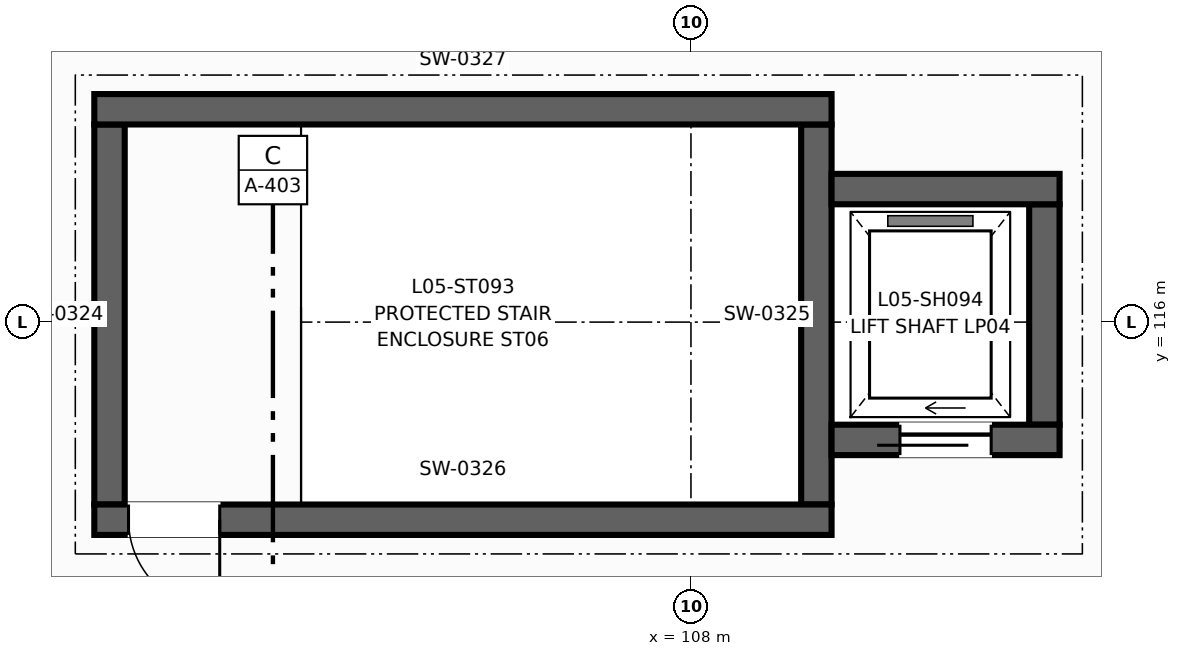
"""IFC4 building model, lengths in metres.
Left out: names, types, materials, properties, quantities, classifications, styles, units other than length and angle.
Written with IfcOpenShell. Run it as: python <this file> out.ifc"""

import sys

from ifc_helpers import new_model, si_unit, direction, frame, frame_2d, origin, place, context, subcontext, project, spatial, rectangle, extrude, element, fill, save


model = new_model("IFC4")
c1 = context("Model", 3, precision=1e-05, world=origin(), true_north=direction((0.0, 1.0)))
c2 = subcontext(c1, "Body", "Model", "MODEL_VIEW")
j1 = project(units=[si_unit("LENGTHUNIT", "METRE"), si_unit("PLANEANGLEUNIT", "RADIAN")], contexts=[c1])
p1 = place(None, origin())
s1 = spatial("IfcSite", under=j1, at=p1, CompositionType="ELEMENT")
p2 = place(p1, origin())
s2 = spatial("IfcBuilding", under=s1, at=p2, CompositionType="ELEMENT")
p3 = place(p2, frame((0.0, 0.0, 22.5)))
s3 = spatial("IfcBuildingStorey", under=s2, at=p3, CompositionType="ELEMENT", Elevation=22.5)
for number, where, z_axis, x_axis in (
    (1, (100.35, 113.6, 0.0), (0.0, 0.0, 1.0), (0.0, 1.0, 0.0)),
    (2, (109.65, 113.6, 0.0), (0.0, 0.0, 1.0), (0.0, 1.0, 0.0)),
):
    element("IfcWall", number, at=place(p3, frame(where, z_axis=z_axis, x_axis=x_axis)), inside=s3, PredefinedType="SHEAR", context=c2, shape_type="SweptSolid", body=[
        extrude(rectangle(XDim=5.0, YDim=0.4, at=frame_2d((2.5, 0.0))), origin(), (0.0, 0.0, 1.0), 4.28),
    ])
p4 = place(p3, frame((100.15, 113.4, 0.0), z_axis=(0.0, 0.0, 1.0), x_axis=(1.0, 0.0, 0.0)))
e3 = element("IfcWall", 3, at=p4, inside=s3, PredefinedType="SHEAR", context=c2, shape_type="SweptSolid", body=[
    extrude(rectangle(XDim=9.7, YDim=0.4, at=frame_2d((4.85, 0.0))), origin(), (0.0, 0.0, 1.0), 4.28),
])
p5 = place(p4, frame((0.45, 0.0, 0.0)))
e4 = element("IfcOpeningElement", 4, at=p5, cuts=e3, PredefinedType="OPENING", context=c2, shape_type="SweptSolid", body=[
    extrude(rectangle(XDim=1.2, YDim=2.2, at=frame_2d((0.6, 1.1))), frame((0.0, 0.21, 0.0), z_axis=(0.0, -1.0, 0.0), x_axis=(1.0, 0.0, 0.0)), (0.0, 0.0, 1.0), 0.42),
])
p6 = place(p3, frame((100.15, 118.8, 0.0), z_axis=(0.0, 0.0, 1.0), x_axis=(1.0, 0.0, 0.0)))
e5 = element("IfcWall", 5, at=p6, inside=s3, PredefinedType="SHEAR", context=c2, shape_type="SweptSolid", body=[
    extrude(rectangle(XDim=9.7, YDim=0.4, at=frame_2d((4.85, 0.0))), origin(), (0.0, 0.0, 1.0), 4.28),
])
p7 = place(p3, frame((112.65, 114.65, 0.0), z_axis=(0.0, 0.0, 1.0), x_axis=(0.0, 1.0, 0.0)))
e6 = element("IfcWall", 6, at=p7, inside=s3, PredefinedType="SHEAR", context=c2, shape_type="SweptSolid", body=[
    extrude(rectangle(XDim=2.9, YDim=0.4, at=frame_2d((1.45, 0.0))), origin(), (0.0, 0.0, 1.0), 4.28),
])
p8 = place(p3, frame((109.85, 114.45, 0.0), z_axis=(0.0, 0.0, 1.0), x_axis=(1.0, 0.0, 0.0)))
e7 = element("IfcWall", 7, at=p8, inside=s3, PredefinedType="SHEAR", context=c2, shape_type="SweptSolid", body=[
    extrude(rectangle(XDim=3.0, YDim=0.4, at=frame_2d((1.5, 0.0))), origin(), (0.0, 0.0, 1.0), 4.28),
])
p9 = place(p8, frame((0.9, 0.0, 0.0)))
e8 = element("IfcOpeningElement", 8, at=p9, cuts=e7, PredefinedType="OPENING", context=c2, shape_type="SweptSolid", body=[
    extrude(rectangle(XDim=1.2, YDim=2.2, at=frame_2d((0.6, 1.1))), frame((0.0, 0.21, 0.0), z_axis=(0.0, -1.0, 0.0), x_axis=(1.0, 0.0, 0.0)), (0.0, 0.0, 1.0), 0.42),
])
p10 = place(p3, frame((109.85, 117.75, 0.0), z_axis=(0.0, 0.0, 1.0), x_axis=(1.0, 0.0, 0.0)))
e9 = element("IfcWall", 9, at=p10, inside=s3, PredefinedType="SHEAR", context=c2, shape_type="SweptSolid", body=[
    extrude(rectangle(XDim=3.0, YDim=0.4, at=frame_2d((1.5, 0.0))), origin(), (0.0, 0.0, 1.0), 4.28),
])
p11 = place(p5, frame((1.2, 0.0, 0.0), z_axis=(0.0, 0.0, 1.0), x_axis=(-1.0, 0.0, 0.0)))
e10 = element("IfcDoor", 10, at=p11, inside=s3, OperationType="SINGLE_SWING_RIGHT", PredefinedType="DOOR", context=c2, shape_type="SweptSolid", body=[
    extrude(rectangle(XDim=1.2, YDim=2.2, at=frame_2d((0.6, 1.1))), frame((0.0, 0.025, 0.0), z_axis=(0.0, -1.0, 0.0), x_axis=(1.0, 0.0, 0.0)), (0.0, 0.0, 1.0), 0.05),
])
fill(e4, e10)
p12 = place(p9, origin())
e11 = element("IfcDoor", 11, at=p12, inside=s3, OperationType="SLIDING_TO_LEFT", PredefinedType="DOOR", context=c2, shape_type="SweptSolid", body=[
    extrude(rectangle(XDim=1.2, YDim=2.2, at=frame_2d((0.6, 1.1))), frame((0.0, 0.025, 0.0), z_axis=(0.0, -1.0, 0.0), x_axis=(1.0, 0.0, 0.0)), (0.0, 0.0, 1.0), 0.05),
])
fill(e8, e11)
save(model, sys.argv[1])
